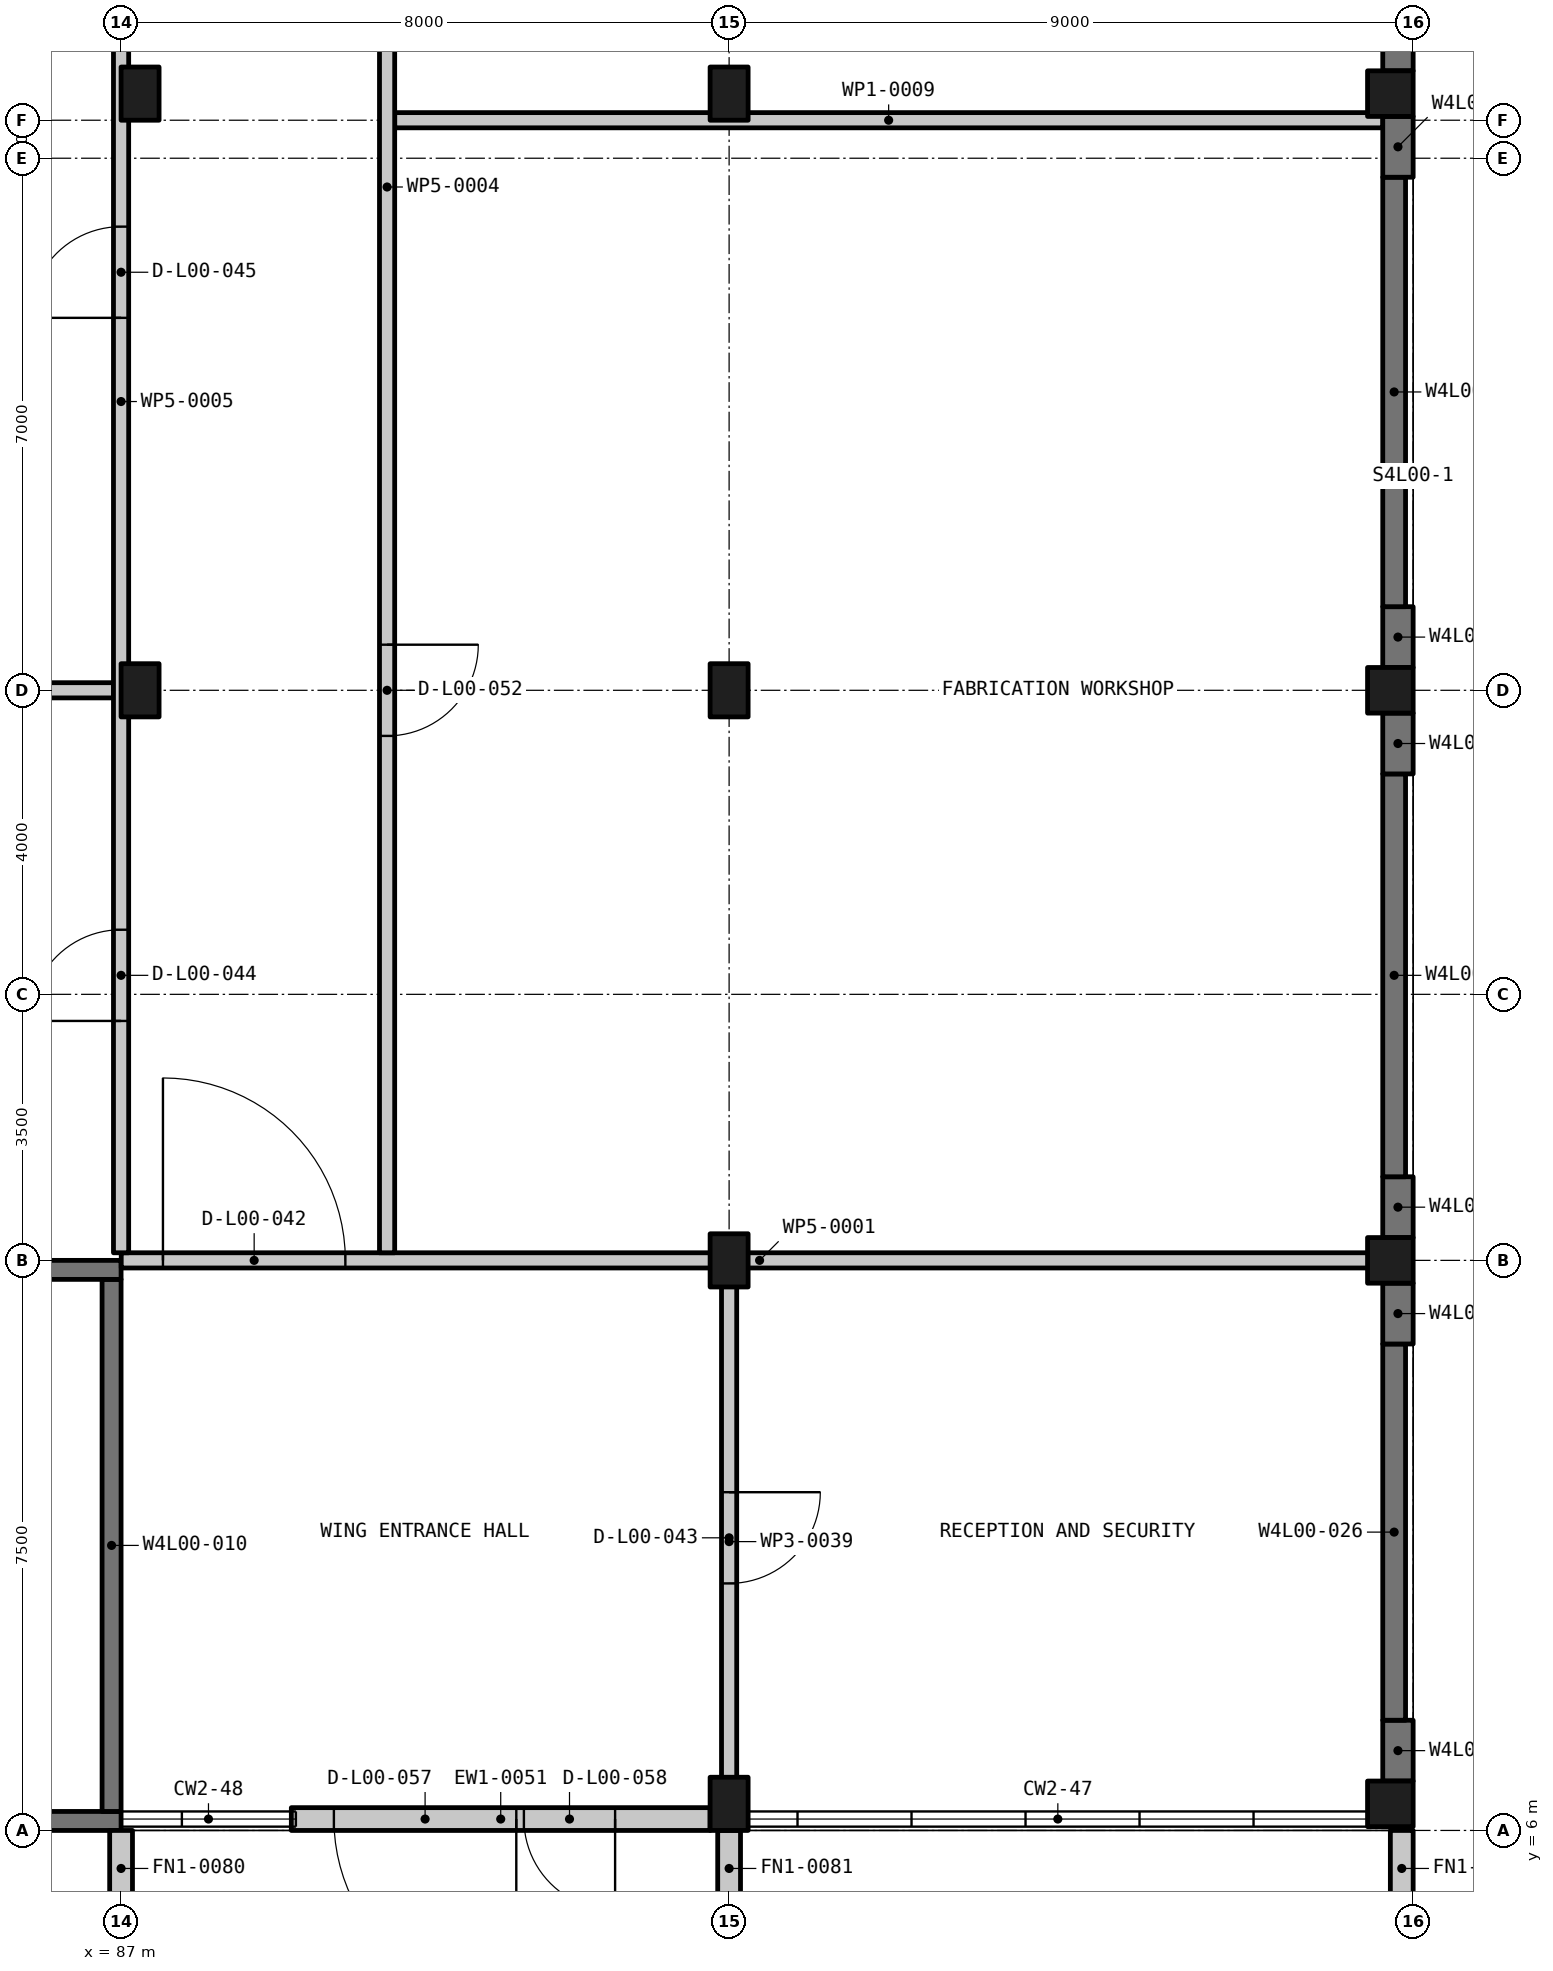
"""IFC4 building model, lengths in metres.
Left out: names, types, materials, properties, quantities, classifications, styles, units other than length and angle.
Written with IfcOpenShell. Run it as: python <this file> out.ifc"""

import sys

from ifc_helpers import new_model, si_unit, direction, frame, frame_2d, origin, origin_2d, place, context, subcontext, project, spatial, rectangle, extrude, element, fill, save


model = new_model("IFC4")
c1 = context("Model", 3, precision=1e-05, world=origin(), true_north=direction((0.0, 1.0)))
c2 = subcontext(c1, "Body", "Model", "MODEL_VIEW")
j1 = project(units=[si_unit("LENGTHUNIT", "METRE"), si_unit("PLANEANGLEUNIT", "RADIAN")], contexts=[c1])
p1 = place(None, origin())
s1 = spatial("IfcSite", under=j1, at=p1, CompositionType="ELEMENT")
p2 = place(p1, origin())
s2 = spatial("IfcBuilding", under=s1, at=p2, CompositionType="ELEMENT")
p3 = place(p2, origin())
s3 = spatial("IfcBuildingStorey", under=s2, at=p3, CompositionType="ELEMENT", Elevation=0.0)
for number, where, z_axis, x_axis in (
    (1, (87.25, 21.0, -0.2), (0.0, 0.0, 1.0), (1.0, 0.0, 0.0)),
    (2, (87.25, 28.85, -0.2), (0.0, 0.0, 1.0), (1.0, 0.0, 0.0)),
    (3, (95.0, 6.35, -0.2), (0.0, 0.0, 1.0), (1.0, 0.0, 0.0)),
    (4, (95.0, 13.5, -0.2), (0.0, 0.0, 1.0), (1.0, 0.0, 0.0)),
    (5, (95.0, 21.0, -0.2), (0.0, 0.0, 1.0), (1.0, 0.0, 0.0)),
    (6, (95.0, 28.85, -0.2), (0.0, 0.0, 1.0), (1.0, 0.0, 0.0)),
):
    element("IfcColumn", number, at=place(p3, frame(where, z_axis=z_axis, x_axis=x_axis)), inside=s3, PredefinedType="COLUMN", context=c2, shape_type="SweptSolid", body=[
        extrude(rectangle(XDim=0.5, YDim=0.7, at=origin_2d()), origin(), (0.0, 0.0, 1.0), 5.9),
    ])
for number, where, z_axis, x_axis in (
    (7, (103.7, 6.35, -0.2), (0.0, 0.0, 1.0), (1.0, 0.0, 0.0)),
    (8, (103.7, 13.5, -0.2), (0.0, 0.0, 1.0), (1.0, 0.0, 0.0)),
    (9, (103.7, 21.0, -0.2), (0.0, 0.0, 1.0), (1.0, 0.0, 0.0)),
    (10, (103.7, 28.85, -0.2), (0.0, 0.0, 1.0), (1.0, 0.0, 0.0)),
):
    element("IfcColumn", number, at=place(p3, frame(where, z_axis=z_axis, x_axis=x_axis)), inside=s3, PredefinedType="COLUMN", context=c2, shape_type="SweptSolid", body=[
        extrude(rectangle(XDim=0.6, YDim=0.6, at=origin_2d()), origin(), (0.0, 0.0, 1.0), 5.9),
    ])
p4 = place(p3, frame((78.0, 6.125, -0.2), z_axis=(0.0, 0.0, 1.0), x_axis=(1.0, 0.0, 0.0)))
e11 = element("IfcWall", 11, at=p4, inside=s3, PredefinedType="SHEAR", context=c2, shape_type="SweptSolid", body=[
    extrude(rectangle(XDim=9.0, YDim=0.25, at=frame_2d((4.5, 0.0))), origin(), (0.0, 0.0, 1.0), 5.9),
])
p5 = place(p3, frame((86.875, 6.25, -0.2), z_axis=(0.0, 0.0, 1.0), x_axis=(0.0, 1.0, 0.0)))
e12 = element("IfcWall", 12, at=p5, inside=s3, PredefinedType="SHEAR", context=c2, shape_type="SweptSolid", body=[
    extrude(rectangle(XDim=7.0, YDim=0.25, at=frame_2d((3.5, 0.0))), origin(), (0.0, 0.0, 1.0), 5.9),
])
p6 = place(p3, frame((78.0, 13.375, -0.2), z_axis=(0.0, 0.0, 1.0), x_axis=(1.0, 0.0, 0.0)))
e13 = element("IfcWall", 13, at=p6, inside=s3, PredefinedType="SHEAR", context=c2, shape_type="SweptSolid", body=[
    extrude(rectangle(XDim=9.0, YDim=0.25, at=frame_2d((4.5, 0.0))), origin(), (0.0, 0.0, 1.0), 5.9),
])
p7 = place(p3, frame((103.8, 6.65, -0.2), z_axis=(0.0, 0.0, 1.0), x_axis=(0.0, 1.0, 0.0)))
e14 = element("IfcWall", 14, at=p7, inside=s3, PredefinedType="SOLIDWALL", context=c2, shape_type="SweptSolid", body=[
    extrude(rectangle(XDim=0.8, YDim=0.4, at=frame_2d((0.4, 0.0))), origin(), (0.0, 0.0, 1.0), 5.9),
])
p8 = place(p3, frame((103.75, 7.45, -0.2), z_axis=(0.0, 0.0, 1.0), x_axis=(0.0, 1.0, 0.0)))
e15 = element("IfcWall", 15, at=p8, inside=s3, PredefinedType="SOLIDWALL", context=c2, shape_type="SweptSolid", body=[
    extrude(rectangle(XDim=4.95, YDim=0.3, at=frame_2d((2.475, 0.0))), origin(), (0.0, 0.0, 1.0), 5.9),
])
for number, where, z_axis, x_axis in (
    (16, (103.8, 12.4, -0.2), (0.0, 0.0, 1.0), (0.0, 1.0, 0.0)),
    (17, (103.8, 13.8, -0.2), (0.0, 0.0, 1.0), (0.0, 1.0, 0.0)),
):
    element("IfcWall", number, at=place(p3, frame(where, z_axis=z_axis, x_axis=x_axis)), inside=s3, PredefinedType="SOLIDWALL", context=c2, shape_type="SweptSolid", body=[
        extrude(rectangle(XDim=0.8, YDim=0.4, at=frame_2d((0.4, 0.0))), origin(), (0.0, 0.0, 1.0), 5.9),
    ])
p9 = place(p3, frame((103.75, 14.6, -0.2), z_axis=(0.0, 0.0, 1.0), x_axis=(0.0, 1.0, 0.0)))
e18 = element("IfcWall", 18, at=p9, inside=s3, PredefinedType="SOLIDWALL", context=c2, shape_type="SweptSolid", body=[
    extrude(rectangle(XDim=5.3, YDim=0.3, at=frame_2d((2.65, 0.0))), origin(), (0.0, 0.0, 1.0), 5.9),
])
for number, where, z_axis, x_axis in (
    (19, (103.8, 19.9, -0.2), (0.0, 0.0, 1.0), (0.0, 1.0, 0.0)),
    (20, (103.8, 21.3, -0.2), (0.0, 0.0, 1.0), (0.0, 1.0, 0.0)),
):
    element("IfcWall", number, at=place(p3, frame(where, z_axis=z_axis, x_axis=x_axis)), inside=s3, PredefinedType="SOLIDWALL", context=c2, shape_type="SweptSolid", body=[
        extrude(rectangle(XDim=0.8, YDim=0.4, at=frame_2d((0.4, 0.0))), origin(), (0.0, 0.0, 1.0), 5.9),
    ])
p10 = place(p3, frame((103.75, 22.1, -0.2), z_axis=(0.0, 0.0, 1.0), x_axis=(0.0, 1.0, 0.0)))
e21 = element("IfcWall", 21, at=p10, inside=s3, PredefinedType="SOLIDWALL", context=c2, shape_type="SweptSolid", body=[
    extrude(rectangle(XDim=5.65, YDim=0.3, at=frame_2d((2.825, 0.0))), origin(), (0.0, 0.0, 1.0), 5.9),
])
for number, where, z_axis, x_axis in (
    (22, (103.8, 27.75, -0.2), (0.0, 0.0, 1.0), (0.0, 1.0, 0.0)),
    (23, (103.8, 29.15, -0.2), (0.0, 0.0, 1.0), (0.0, 1.0, 0.0)),
):
    element("IfcWall", number, at=place(p3, frame(where, z_axis=z_axis, x_axis=x_axis)), inside=s3, PredefinedType="SOLIDWALL", context=c2, shape_type="SweptSolid", body=[
        extrude(rectangle(XDim=0.8, YDim=0.4, at=frame_2d((0.4, 0.0))), origin(), (0.0, 0.0, 1.0), 5.9),
    ])
p11 = place(p3, frame((94.75, 6.15, 0.0), z_axis=(0.0, 0.0, 1.0), x_axis=(-1.0, 0.0, 0.0)))
e24 = element("IfcWall", 24, at=p11, inside=s3, PredefinedType="SOLIDWALL", context=c2, shape_type="SweptSolid", body=[
    extrude(rectangle(XDim=5.51, YDim=0.3, at=frame_2d((2.755, 0.0))), origin(), (0.0, 0.0, 1.0), 4.8),
])
p12 = place(p11, frame((2.55, 0.0, 0.0)))
e25 = element("IfcOpeningElement", 25, at=p12, cuts=e24, PredefinedType="OPENING", context=c2, shape_type="SweptSolid", body=[
    extrude(rectangle(XDim=2.4, YDim=2.4, at=frame_2d((1.2, 1.2))), frame((0.0, 0.16, 0.0), z_axis=(0.0, -1.0, 0.0), x_axis=(1.0, 0.0, 0.0)), (0.0, 0.0, 1.0), 0.32),
])
p13 = place(p11, frame((1.25, 0.0, 0.0)))
e26 = element("IfcOpeningElement", 26, at=p13, cuts=e24, PredefinedType="OPENING", context=c2, shape_type="SweptSolid", body=[
    extrude(rectangle(XDim=1.2, YDim=2.2, at=frame_2d((0.6, 1.1))), frame((0.0, 0.16, 0.0), z_axis=(0.0, -1.0, 0.0), x_axis=(1.0, 0.0, 0.0)), (0.0, 0.0, 1.0), 0.32),
])
for number, where, z_axis, x_axis in (
    (27, (87.0, 6.0, 0.0), (0.0, 0.0, 1.0), (0.0, -1.0, 0.0)),
    (28, (95.0, 6.0, 0.0), (0.0, 0.0, 1.0), (0.0, -1.0, 0.0)),
    (29, (103.85, 6.0, 0.0), (0.0, 0.0, 1.0), (0.0, -1.0, 0.0)),
):
    element("IfcWall", number, at=place(p3, frame(where, z_axis=z_axis, x_axis=x_axis)), inside=s3, PredefinedType="SOLIDWALL", context=c2, shape_type="SweptSolid", body=[
        extrude(rectangle(XDim=1.0, YDim=0.3, at=frame_2d((0.5, 0.0))), origin(), (0.0, 0.0, 1.0), 6.0),
    ])
p14 = place(p3, frame((87.002, 13.5, 0.0), z_axis=(0.0, 0.0, 1.0), x_axis=(1.0, 0.0, 0.0)))
e30 = element("IfcWall", 30, at=p14, inside=s3, PredefinedType="PARTITIONING", context=c2, shape_type="SweptSolid", body=[
    extrude(rectangle(XDim=16.798, YDim=0.2, at=frame_2d((8.399, 0.0))), origin(), (0.0, 0.0, 1.0), 4.8),
])
p15 = place(p14, frame((0.549, 0.0, 0.0)))
e31 = element("IfcOpeningElement", 31, at=p15, cuts=e30, PredefinedType="OPENING", context=c2, shape_type="SweptSolid", body=[
    extrude(rectangle(XDim=2.4, YDim=2.1, at=frame_2d((1.2, 1.05))), frame((0.0, 0.11, 0.0), z_axis=(0.0, -1.0, 0.0), x_axis=(1.0, 0.0, 0.0)), (0.0, 0.0, 1.0), 0.22),
])
p16 = place(p3, frame((78.2, 21.0, 0.0), z_axis=(0.0, 0.0, 1.0), x_axis=(1.0, 0.0, 0.0)))
e32 = element("IfcWall", 32, at=p16, inside=s3, PredefinedType="PARTITIONING", context=c2, shape_type="SweptSolid", body=[
    extrude(rectangle(XDim=8.7, YDim=0.2, at=frame_2d((4.35, 0.0))), origin(), (0.0, 0.0, 1.0), 4.9),
])
p17 = place(p3, frame((90.6, 28.5, 0.0), z_axis=(0.0, 0.0, 1.0), x_axis=(1.0, 0.0, 0.0)))
e33 = element("IfcWall", 33, at=p17, inside=s3, PredefinedType="PARTITIONING", context=c2, shape_type="SweptSolid", body=[
    extrude(rectangle(XDim=12.998, YDim=0.2, at=frame_2d((6.499, 0.0))), origin(), (0.0, 0.0, 1.0), 4.9),
])
p18 = place(p3, frame((95.0, 13.4, 0.0), z_axis=(0.0, 0.0, 1.0), x_axis=(0.0, -1.0, 0.0)))
e34 = element("IfcWall", 34, at=p18, inside=s3, PredefinedType="PARTITIONING", context=c2, shape_type="SweptSolid", body=[
    extrude(rectangle(XDim=7.2, YDim=0.2, at=frame_2d((3.6, 0.0))), origin(), (0.0, 0.0, 1.0), 4.9),
])
p19 = place(p18, frame((2.95, 0.0, 0.0)))
e35 = element("IfcOpeningElement", 35, at=p19, cuts=e34, PredefinedType="OPENING", context=c2, shape_type="SweptSolid", body=[
    extrude(rectangle(XDim=1.2, YDim=2.1, at=frame_2d((0.6, 1.05))), frame((0.0, 0.11, 0.0), z_axis=(0.0, -1.0, 0.0), x_axis=(1.0, 0.0, 0.0)), (0.0, 0.0, 1.0), 0.22),
])
p20 = place(p3, frame((90.5, 80.8, 0.0), z_axis=(0.0, 0.0, 1.0), x_axis=(0.0, -1.0, 0.0)))
e36 = element("IfcWall", 36, at=p20, inside=s3, PredefinedType="PARTITIONING", context=c2, shape_type="SweptSolid", body=[
    extrude(rectangle(XDim=67.2, YDim=0.2, at=frame_2d((33.6, 0.0))), origin(), (0.0, 0.0, 1.0), 4.8),
])
p21 = place(p20, frame((59.2, 0.0, 0.0)))
e37 = element("IfcOpeningElement", 37, at=p21, cuts=e36, PredefinedType="OPENING", context=c2, shape_type="SweptSolid", body=[
    extrude(rectangle(XDim=1.2, YDim=2.1, at=frame_2d((0.6, 1.05))), frame((0.0, 0.11, 0.0), z_axis=(0.0, -1.0, 0.0), x_axis=(1.0, 0.0, 0.0)), (0.0, 0.0, 1.0), 0.22),
])
p22 = place(p20, frame((44.2, 0.0, 0.0)))
e38 = element("IfcOpeningElement", 38, at=p22, cuts=e36, PredefinedType="OPENING", context=c2, shape_type="SweptSolid", body=[
    extrude(rectangle(XDim=1.2, YDim=2.1, at=frame_2d((0.6, 1.05))), frame((0.0, 0.11, 0.0), z_axis=(0.0, -1.0, 0.0), x_axis=(1.0, 0.0, 0.0)), (0.0, 0.0, 1.0), 0.22),
])
p23 = place(p20, frame((35.199, 0.0, 0.0)))
e39 = element("IfcOpeningElement", 39, at=p23, cuts=e36, PredefinedType="OPENING", context=c2, shape_type="SweptSolid", body=[
    extrude(rectangle(XDim=1.2, YDim=2.1, at=frame_2d((0.6, 1.05))), frame((0.0, 0.11, 0.0), z_axis=(0.0, -1.0, 0.0), x_axis=(1.0, 0.0, 0.0)), (0.0, 0.0, 1.0), 0.22),
])
p24 = place(p20, frame((17.95, 0.0, 0.0)))
e40 = element("IfcOpeningElement", 40, at=p24, cuts=e36, PredefinedType="OPENING", context=c2, shape_type="SweptSolid", body=[
    extrude(rectangle(XDim=1.2, YDim=2.1, at=frame_2d((0.6, 1.05))), frame((0.0, 0.11, 0.0), z_axis=(0.0, -1.0, 0.0), x_axis=(1.0, 0.0, 0.0)), (0.0, 0.0, 1.0), 0.22),
])
p25 = place(p20, frame((6.825, 0.0, 0.0)))
e41 = element("IfcOpeningElement", 41, at=p25, cuts=e36, PredefinedType="OPENING", context=c2, shape_type="SweptSolid", body=[
    extrude(rectangle(XDim=1.2, YDim=2.1, at=frame_2d((0.6, 1.05))), frame((0.0, 0.11, 0.0), z_axis=(0.0, -1.0, 0.0), x_axis=(1.0, 0.0, 0.0)), (0.0, 0.0, 1.0), 0.22),
])
p26 = place(p3, frame((87.0, 13.6, 0.0), z_axis=(0.0, 0.0, 1.0), x_axis=(0.0, 1.0, 0.0)))
e42 = element("IfcWall", 42, at=p26, inside=s3, PredefinedType="PARTITIONING", context=c2, shape_type="SweptSolid", body=[
    extrude(rectangle(XDim=22.398, YDim=0.2, at=frame_2d((11.199, 0.0))), origin(), (0.0, 0.0, 1.0), 4.8),
])
p27 = place(p26, frame((19.65, 0.0, 0.0)))
e43 = element("IfcOpeningElement", 43, at=p27, cuts=e42, PredefinedType="OPENING", context=c2, shape_type="SweptSolid", body=[
    extrude(rectangle(XDim=1.5, YDim=2.1, at=frame_2d((0.75, 1.05))), frame((0.0, 0.11, 0.0), z_axis=(0.0, -1.0, 0.0), x_axis=(1.0, 0.0, 0.0)), (0.0, 0.0, 1.0), 0.22),
])
p28 = place(p26, frame((3.05, 0.0, 0.0)))
e44 = element("IfcOpeningElement", 44, at=p28, cuts=e42, PredefinedType="OPENING", context=c2, shape_type="SweptSolid", body=[
    extrude(rectangle(XDim=1.2, YDim=2.1, at=frame_2d((0.6, 1.05))), frame((0.0, 0.11, 0.0), z_axis=(0.0, -1.0, 0.0), x_axis=(1.0, 0.0, 0.0)), (0.0, 0.0, 1.0), 0.22),
])
p29 = place(p26, frame((12.3, 0.0, 0.0)))
e45 = element("IfcOpeningElement", 45, at=p29, cuts=e42, PredefinedType="OPENING", context=c2, shape_type="SweptSolid", body=[
    extrude(rectangle(XDim=1.2, YDim=2.1, at=frame_2d((0.6, 1.05))), frame((0.0, 0.11, 0.0), z_axis=(0.0, -1.0, 0.0), x_axis=(1.0, 0.0, 0.0)), (0.0, 0.0, 1.0), 0.22),
])
p30 = place(p12, origin())
e46 = element("IfcDoor", 46, at=p30, inside=s3, OperationType="SINGLE_SWING_LEFT", PredefinedType="DOOR", context=c2, shape_type="SweptSolid", body=[
    extrude(rectangle(XDim=2.4, YDim=2.4, at=frame_2d((1.2, 1.2))), frame((0.0, 0.025, 0.0), z_axis=(0.0, -1.0, 0.0), x_axis=(1.0, 0.0, 0.0)), (0.0, 0.0, 1.0), 0.05),
])
fill(e25, e46)
p31 = place(p13, origin())
e47 = element("IfcDoor", 47, at=p31, inside=s3, OperationType="SINGLE_SWING_LEFT", PredefinedType="DOOR", context=c2, shape_type="SweptSolid", body=[
    extrude(rectangle(XDim=1.2, YDim=2.2, at=frame_2d((0.6, 1.1))), frame((0.0, 0.025, 0.0), z_axis=(0.0, -1.0, 0.0), x_axis=(1.0, 0.0, 0.0)), (0.0, 0.0, 1.0), 0.05),
])
fill(e26, e47)
p32 = place(p15, origin())
e48 = element("IfcDoor", 48, at=p32, inside=s3, OperationType="DOUBLE_DOOR_SINGLE_SWING", PredefinedType="DOOR", context=c2, shape_type="SweptSolid", body=[
    extrude(rectangle(XDim=2.4, YDim=2.1, at=frame_2d((1.2, 1.05))), frame((0.0, 0.025, 0.0), z_axis=(0.0, -1.0, 0.0), x_axis=(1.0, 0.0, 0.0)), (0.0, 0.0, 1.0), 0.05),
])
fill(e31, e48)
p33 = place(p19, origin())
e49 = element("IfcDoor", 49, at=p33, inside=s3, OperationType="SINGLE_SWING_RIGHT", PredefinedType="DOOR", context=c2, shape_type="SweptSolid", body=[
    extrude(rectangle(XDim=1.2, YDim=2.1, at=frame_2d((0.6, 1.05))), frame((0.0, 0.025, 0.0), z_axis=(0.0, -1.0, 0.0), x_axis=(1.0, 0.0, 0.0)), (0.0, 0.0, 1.0), 0.05),
])
fill(e35, e49)
p34 = place(p28, origin())
e50 = element("IfcDoor", 50, at=p34, inside=s3, OperationType="SINGLE_SWING_RIGHT", PredefinedType="DOOR", context=c2, shape_type="SweptSolid", body=[
    extrude(rectangle(XDim=1.2, YDim=2.1, at=frame_2d((0.6, 1.05))), frame((0.0, 0.025, 0.0), z_axis=(0.0, -1.0, 0.0), x_axis=(1.0, 0.0, 0.0)), (0.0, 0.0, 1.0), 0.05),
])
fill(e44, e50)
p35 = place(p29, origin())
e51 = element("IfcDoor", 51, at=p35, inside=s3, OperationType="SINGLE_SWING_LEFT", PredefinedType="DOOR", context=c2, shape_type="SweptSolid", body=[
    extrude(rectangle(XDim=1.2, YDim=2.1, at=frame_2d((0.6, 1.05))), frame((0.0, 0.025, 0.0), z_axis=(0.0, -1.0, 0.0), x_axis=(1.0, 0.0, 0.0)), (0.0, 0.0, 1.0), 0.05),
])
fill(e45, e51)
p36 = place(p21, origin())
e52 = element("IfcDoor", 52, at=p36, inside=s3, OperationType="SINGLE_SWING_LEFT", PredefinedType="DOOR", context=c2, shape_type="SweptSolid", body=[
    extrude(rectangle(XDim=1.2, YDim=2.1, at=frame_2d((0.6, 1.05))), frame((0.0, 0.025, 0.0), z_axis=(0.0, -1.0, 0.0), x_axis=(1.0, 0.0, 0.0)), (0.0, 0.0, 1.0), 0.05),
])
fill(e37, e52)
save(model, sys.argv[1])
